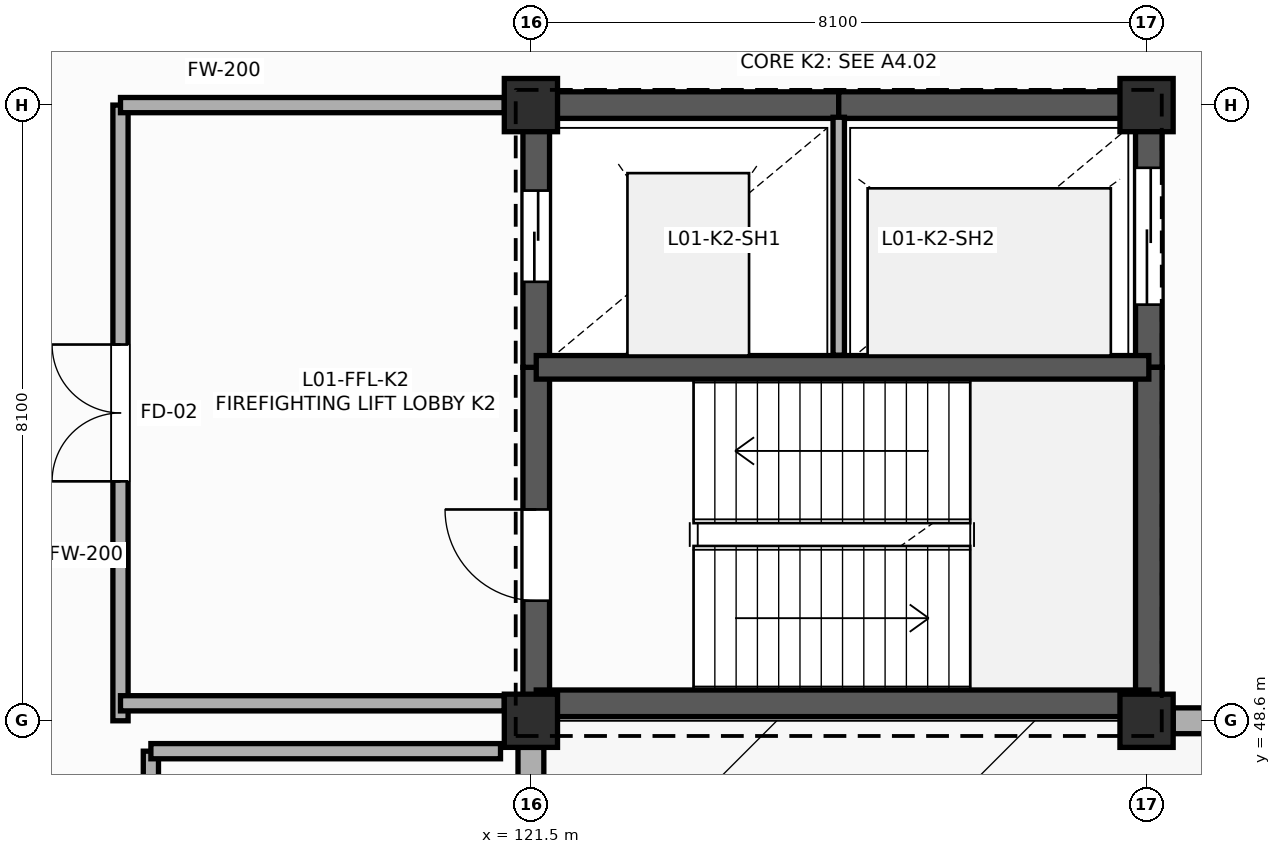
"""IFC4 building model, lengths in metres.
Left out: names, types, materials, properties, quantities, classifications, styles, units other than length and angle.
Written with IfcOpenShell. Run it as: python <this file> out.ifc"""

import sys

from ifc_helpers import new_model, si_unit, direction, frame, frame_2d, origin, origin_2d, place, context, subcontext, project, spatial, rectangle, extrude, element, fill, save


model = new_model("IFC4")
c1 = context("Model", 3, precision=1e-05, world=origin(), true_north=direction((0.0, 1.0)))
c2 = subcontext(c1, "Body", "Model", "MODEL_VIEW")
j1 = project(units=[si_unit("LENGTHUNIT", "METRE"), si_unit("PLANEANGLEUNIT", "RADIAN")], contexts=[c1])
p1 = place(None, origin())
s1 = spatial("IfcSite", under=j1, at=p1, CompositionType="ELEMENT")
p2 = place(p1, origin())
s2 = spatial("IfcBuilding", under=s1, at=p2, CompositionType="ELEMENT")
p3 = place(p2, frame((0.0, 0.0, 5.4)))
s3 = spatial("IfcBuildingStorey", under=s2, at=p3, CompositionType="ELEMENT", Elevation=5.4)
for number, where, z_axis, x_axis in (
    (1, (121.5, 48.6, 0.0), (0.0, 0.0, 1.0), (1.0, 0.0, 0.0)),
    (2, (121.5, 56.7, 0.0), (0.0, 0.0, 1.0), (1.0, 0.0, 0.0)),
    (3, (129.6, 48.6, 0.0), (0.0, 0.0, 1.0), (1.0, 0.0, 0.0)),
    (4, (129.6, 56.7, 0.0), (0.0, 0.0, 1.0), (1.0, 0.0, 0.0)),
):
    element("IfcColumn", number, at=place(p3, frame(where, z_axis=z_axis, x_axis=x_axis)), inside=s3, PredefinedType="COLUMN", context=c2, shape_type="SweptSolid", body=[
        extrude(rectangle(XDim=0.7, YDim=0.7, at=origin_2d()), origin(), (0.0, 0.0, 1.0), 4.8),
    ])
p4 = place(p3, frame((121.5, 40.8, 0.0), z_axis=(0.0, 0.0, 1.0), x_axis=(0.0, 1.0, 0.0)))
e5 = element("IfcWall", 5, at=p4, inside=s3, PredefinedType="SOLIDWALL", context=c2, shape_type="SweptSolid", body=[
    extrude(rectangle(XDim=7.45, YDim=0.34, at=frame_2d((3.725, 0.0))), origin(), (0.0, 0.0, 1.0), 4.167),
])
p5 = place(p3, frame((129.95, 48.6, 0.0), z_axis=(0.0, 0.0, 1.0), x_axis=(1.0, 0.0, 0.0)))
e6 = element("IfcWall", 6, at=p5, inside=s3, PredefinedType="SOLIDWALL", context=c2, shape_type="SweptSolid", body=[
    extrude(rectangle(XDim=7.4, YDim=0.34, at=frame_2d((3.7, 0.0))), origin(), (0.0, 0.0, 1.0), 4.055),
])
p6 = place(p3, frame((121.57, 48.83, 0.0), z_axis=(0.0, 0.0, 1.0), x_axis=(0.0, 1.0, 0.0)))
e7 = element("IfcWall", 7, at=p6, inside=s3, PredefinedType="SHEAR", context=c2, shape_type="SweptSolid", body=[
    extrude(rectangle(XDim=4.42, YDim=0.35, at=frame_2d((2.21, 0.0))), origin(), (0.0, 0.0, 1.0), 4.8),
])
p7 = place(p6, frame((1.35, 0.0, 0.0)))
e8 = element("IfcOpeningElement", 8, at=p7, cuts=e7, PredefinedType="OPENING", context=c2, shape_type="SweptSolid", body=[
    extrude(rectangle(XDim=1.2, YDim=2.25, at=frame_2d((0.6, 1.125))), frame((0.0, 0.185, 0.0), z_axis=(0.0, -1.0, 0.0), x_axis=(1.0, 0.0, 0.0)), (0.0, 0.0, 1.0), 0.37),
])
p8 = place(p3, frame((121.57, 53.25, 0.0), z_axis=(0.0, 0.0, 1.0), x_axis=(0.0, 1.0, 0.0)))
e9 = element("IfcWall", 9, at=p8, inside=s3, PredefinedType="SHEAR", context=c2, shape_type="SweptSolid", body=[
    extrude(rectangle(XDim=3.45, YDim=0.35, at=frame_2d((1.725, 0.0))), origin(), (0.0, 0.0, 1.0), 4.8),
])
p9 = place(p8, frame((1.125, 0.0, 0.0)))
e10 = element("IfcOpeningElement", 10, at=p9, cuts=e9, PredefinedType="OPENING", context=c2, shape_type="SweptSolid", body=[
    extrude(rectangle(XDim=1.2, YDim=2.2, at=frame_2d((0.6, 1.1))), frame((0.0, 0.185, 0.0), z_axis=(0.0, -1.0, 0.0), x_axis=(1.0, 0.0, 0.0)), (0.0, 0.0, 1.0), 0.37),
])
p10 = place(p3, frame((121.57, 56.7, 0.0), z_axis=(0.0, 0.0, 1.0), x_axis=(1.0, 0.0, 0.0)))
e11 = element("IfcWall", 11, at=p10, inside=s3, PredefinedType="SHEAR", context=c2, shape_type="SweptSolid", body=[
    extrude(rectangle(XDim=3.98, YDim=0.35, at=frame_2d((1.99, 0.0))), origin(), (0.0, 0.0, 1.0), 4.8),
])
p11 = place(p3, frame((125.55, 56.7, 0.0), z_axis=(0.0, 0.0, 1.0), x_axis=(1.0, 0.0, 0.0)))
e12 = element("IfcWall", 12, at=p11, inside=s3, PredefinedType="SHEAR", context=c2, shape_type="SweptSolid", body=[
    extrude(rectangle(XDim=4.08, YDim=0.35, at=frame_2d((2.04, 0.0))), origin(), (0.0, 0.0, 1.0), 4.8),
])
p12 = place(p3, frame((129.63, 56.7, 0.0), z_axis=(0.0, 0.0, 1.0), x_axis=(0.0, -1.0, 0.0)))
e13 = element("IfcWall", 13, at=p12, inside=s3, PredefinedType="SHEAR", context=c2, shape_type="SweptSolid", body=[
    extrude(rectangle(XDim=3.45, YDim=0.35, at=frame_2d((1.725, 0.0))), origin(), (0.0, 0.0, 1.0), 4.8),
])
p13 = place(p12, frame((0.825, 0.0, 0.0)))
e14 = element("IfcOpeningElement", 14, at=p13, cuts=e13, PredefinedType="OPENING", context=c2, shape_type="SweptSolid", body=[
    extrude(rectangle(XDim=1.8, YDim=2.4, at=frame_2d((0.9, 1.2))), frame((0.0, 0.185, 0.0), z_axis=(0.0, -1.0, 0.0), x_axis=(1.0, 0.0, 0.0)), (0.0, 0.0, 1.0), 0.37),
])
p14 = place(p3, frame((129.63, 53.25, 0.0), z_axis=(0.0, 0.0, 1.0), x_axis=(0.0, -1.0, 0.0)))
e15 = element("IfcWall", 15, at=p14, inside=s3, PredefinedType="SHEAR", context=c2, shape_type="SweptSolid", body=[
    extrude(rectangle(XDim=4.42, YDim=0.35, at=frame_2d((2.21, 0.0))), origin(), (0.0, 0.0, 1.0), 4.8),
])
p15 = place(p3, frame((129.63, 48.83, 0.0), z_axis=(0.0, 0.0, 1.0), x_axis=(-1.0, 0.0, 0.0)))
e16 = element("IfcWall", 16, at=p15, inside=s3, PredefinedType="SHEAR", context=c2, shape_type="SweptSolid", body=[
    extrude(rectangle(XDim=8.06, YDim=0.35, at=frame_2d((4.03, 0.0))), origin(), (0.0, 0.0, 1.0), 4.8),
])
p16 = place(p3, frame((121.57, 53.25, 0.0), z_axis=(0.0, 0.0, 1.0), x_axis=(1.0, 0.0, 0.0)))
e17 = element("IfcWall", 17, at=p16, inside=s3, PredefinedType="SHEAR", context=c2, shape_type="SweptSolid", body=[
    extrude(rectangle(XDim=8.06, YDim=0.31, at=frame_2d((4.03, 0.0))), origin(), (0.0, 0.0, 1.0), 4.8),
])
p17 = place(p3, frame((125.55, 53.41, 0.0), z_axis=(0.0, 0.0, 1.0), x_axis=(0.0, 1.0, 0.0)))
e18 = element("IfcWall", 18, at=p17, inside=s3, PredefinedType="PLUMBINGWALL", context=c2, shape_type="SweptSolid", body=[
    extrude(rectangle(XDim=3.13, YDim=0.15, at=frame_2d((1.565, 0.0))), origin(), (0.0, 0.0, 1.0), 4.45),
])
p18 = place(p3, frame((116.1, 48.6, 0.0), z_axis=(0.0, 0.0, 1.0), x_axis=(0.0, 1.0, 0.0)))
e19 = element("IfcWall", 19, at=p18, inside=s3, PredefinedType="PARTITIONING", context=c2, shape_type="SweptSolid", body=[
    extrude(rectangle(XDim=8.1, YDim=0.2, at=frame_2d((4.05, 0.0))), origin(), (0.0, 0.0, 1.0), 4.5),
])
p19 = place(p18, frame((3.15, 0.0, 0.0)))
e20 = element("IfcOpeningElement", 20, at=p19, cuts=e19, PredefinedType="OPENING", context=c2, shape_type="SweptSolid", body=[
    extrude(rectangle(XDim=1.8, YDim=2.25, at=frame_2d((0.9, 1.125))), frame((0.0, 0.11, 0.0), z_axis=(0.0, -1.0, 0.0), x_axis=(1.0, 0.0, 0.0)), (0.0, 0.0, 1.0), 0.22),
])
p20 = place(p3, frame((116.1, 56.7, 0.0), z_axis=(0.0, 0.0, 1.0), x_axis=(1.0, 0.0, 0.0)))
e21 = element("IfcWall", 21, at=p20, inside=s3, PredefinedType="PARTITIONING", context=c2, shape_type="SweptSolid", body=[
    extrude(rectangle(XDim=5.05, YDim=0.2, at=frame_2d((2.525, 0.0))), origin(), (0.0, 0.0, 1.0), 3.916),
])
p21 = place(p3, frame((121.15, 48.83, 0.0), z_axis=(0.0, 0.0, 1.0), x_axis=(-1.0, 0.0, 0.0)))
e22 = element("IfcWall", 22, at=p21, inside=s3, PredefinedType="PARTITIONING", context=c2, shape_type="SweptSolid", body=[
    extrude(rectangle(XDim=5.05, YDim=0.2, at=frame_2d((2.525, 0.0))), origin(), (0.0, 0.0, 1.0), 3.98),
])
p22 = place(p3, frame((116.5, 40.333, 0.0), z_axis=(0.0, 0.0, 1.0), x_axis=(0.0, 1.0, 0.0)))
e23 = element("IfcWall", 23, at=p22, inside=s3, PredefinedType="PARTITIONING", context=c2, shape_type="SweptSolid", body=[
    extrude(rectangle(XDim=7.867, YDim=0.2, at=frame_2d((3.933, 0.0))), origin(), (0.0, 0.0, 1.0), 4.52),
])
p23 = place(p3, frame((116.5, 48.2, 0.0), z_axis=(0.0, 0.0, 1.0), x_axis=(1.0, 0.0, 0.0)))
e24 = element("IfcWall", 24, at=p23, inside=s3, PredefinedType="PARTITIONING", context=c2, shape_type="SweptSolid", body=[
    extrude(rectangle(XDim=4.6, YDim=0.2, at=frame_2d((2.3, 0.0))), origin(), (0.0, 0.0, 1.0), 4.52),
])
p24 = place(p7, origin())
e25 = element("IfcDoor", 25, at=p24, inside=s3, OperationType="SINGLE_SWING_RIGHT", PredefinedType="DOOR", context=c2, shape_type="SweptSolid", body=[
    extrude(rectangle(XDim=1.2, YDim=2.25, at=frame_2d((0.6, 1.125))), frame((0.0, 0.025, 0.0), z_axis=(0.0, -1.0, 0.0), x_axis=(1.0, 0.0, 0.0)), (0.0, 0.0, 1.0), 0.05),
])
fill(e8, e25)
p25 = place(p9, origin())
e26 = element("IfcDoor", 26, at=p25, inside=s3, OperationType="SLIDING_TO_LEFT", PredefinedType="DOOR", context=c2, shape_type="SweptSolid", body=[
    extrude(rectangle(XDim=1.2, YDim=2.2, at=frame_2d((0.6, 1.1))), frame((0.0, 0.025, 0.0), z_axis=(0.0, -1.0, 0.0), x_axis=(1.0, 0.0, 0.0)), (0.0, 0.0, 1.0), 0.05),
])
fill(e10, e26)
p26 = place(p13, origin())
e27 = element("IfcDoor", 27, at=p26, inside=s3, OperationType="SLIDING_TO_LEFT", PredefinedType="DOOR", context=c2, shape_type="SweptSolid", body=[
    extrude(rectangle(XDim=1.8, YDim=2.4, at=frame_2d((0.9, 1.2))), frame((0.0, 0.025, 0.0), z_axis=(0.0, -1.0, 0.0), x_axis=(1.0, 0.0, 0.0)), (0.0, 0.0, 1.0), 0.05),
])
fill(e14, e27)
p27 = place(p19, origin())
e28 = element("IfcDoor", 28, at=p27, inside=s3, OperationType="DOUBLE_DOOR_SINGLE_SWING", PredefinedType="DOOR", context=c2, shape_type="SweptSolid", body=[
    extrude(rectangle(XDim=1.8, YDim=2.25, at=frame_2d((0.9, 1.125))), frame((0.0, 0.025, 0.0), z_axis=(0.0, -1.0, 0.0), x_axis=(1.0, 0.0, 0.0)), (0.0, 0.0, 1.0), 0.05),
])
fill(e20, e28)
save(model, sys.argv[1])
